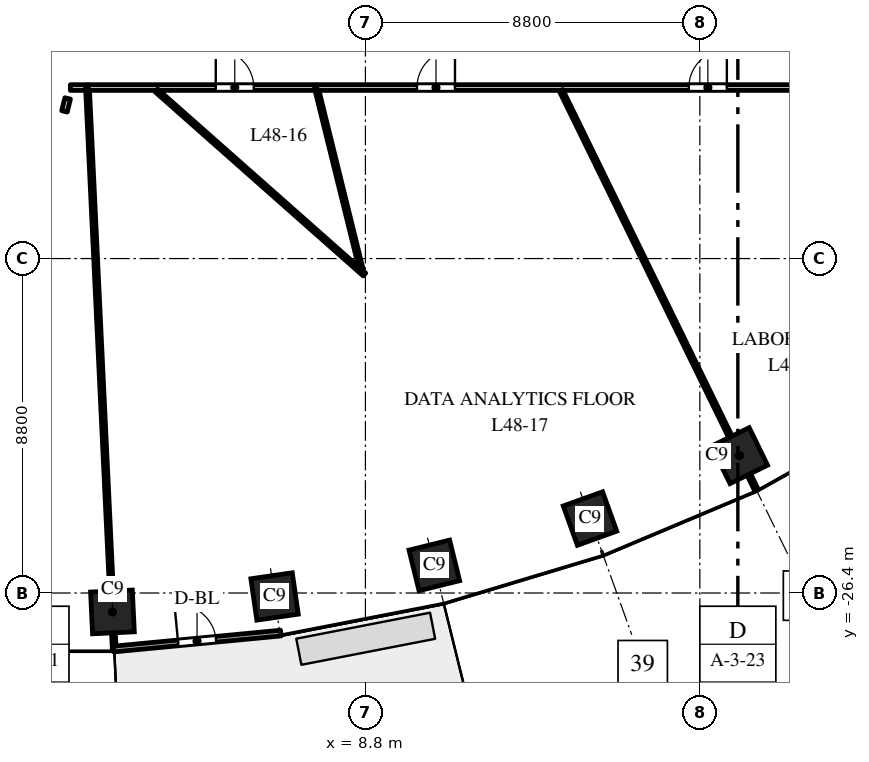
"""IFC4 building model, lengths in metres.
Left out: names, types, materials, properties, quantities, classifications, styles, units other than length and angle.
Written with IfcOpenShell. Run it as: python <this file> out.ifc"""

import sys

from ifc_helpers import new_model, si_unit, direction, frame, frame_2d, origin, origin_2d, place, context, subcontext, project, spatial, rectangle, extrude, element, fill, save


model = new_model("IFC4")
c1 = context("Model", 3, precision=1e-05, world=origin(), true_north=direction((0.0, 1.0)))
c2 = subcontext(c1, "Body", "Model", "MODEL_VIEW")
j1 = project(units=[si_unit("LENGTHUNIT", "METRE"), si_unit("PLANEANGLEUNIT", "RADIAN")], contexts=[c1])
p1 = place(None, origin())
s1 = spatial("IfcSite", under=j1, at=p1, CompositionType="ELEMENT")
p2 = place(p1, origin())
s2 = spatial("IfcBuilding", under=s1, at=p2, CompositionType="ELEMENT")
p3 = place(p2, frame((0.0, 0.0, 233.5)))
s3 = spatial("IfcBuildingStorey", under=s2, at=p3, CompositionType="ELEMENT", Elevation=233.5)
for number, where, z_axis, x_axis in (
    (1, (2.143, -26.898, 0.0), (0.0, 0.0, 1.0), (0.999, 0.048, 0.0)),
    (2, (6.409, -26.491, 0.0), (0.0, 0.0, 1.0), (0.99, 0.143, 0.0)),
    (3, (10.613, -25.674, 0.0), (0.0, 0.0, 1.0), (0.971, 0.24, 0.0)),
    (4, (14.709, -24.441, 0.0), (0.0, 0.0, 1.0), (0.941, 0.338, 0.0)),
    (5, (18.646, -22.785, 0.0), (0.0, 0.0, 1.0), (0.898, 0.439, 0.0)),
):
    element("IfcColumn", number, at=place(p3, frame(where, z_axis=z_axis, x_axis=x_axis)), inside=s3, PredefinedType="COLUMN", context=c2, shape_type="SweptSolid", body=[
        extrude(rectangle(XDim=1.1, YDim=1.1, at=origin_2d()), origin(), (0.0, 0.0, 1.0), 4.0),
    ])
p4 = place(p3, frame((2.166, -27.875, 0.0), z_axis=(0.0, 0.0, 1.0), x_axis=(0.995473879823, 0.095035543824, 0.0)))
e6 = element("IfcWall", 6, at=p4, inside=s3, PredefinedType="STANDARD", context=c2, shape_type="SweptSolid", body=[
    extrude(rectangle(XDim=4.426, YDim=0.15, at=frame_2d((2.213, 0.0))), origin(), (0.0, 0.0, 1.0), 3.7),
])
p5 = place(p4, frame((1.713, 0.0, 0.0)))
e7 = element("IfcOpeningElement", 7, at=p5, cuts=e6, PredefinedType="OPENING", context=c2, shape_type="SweptSolid", body=[
    extrude(rectangle(XDim=1.0, YDim=2.4, at=frame_2d((0.5, 1.2))), frame((0.0, 0.085, 0.0), z_axis=(0.0, -1.0, 0.0), x_axis=(1.0, 0.0, 0.0)), (0.0, 0.0, 1.0), 0.17),
])
p6 = place(p3, frame((0.881, -13.727, 0.0), z_axis=(0.0, 0.0, 1.0), x_axis=(0.239099704585, 0.970995021237, 0.0)))
e8 = element("IfcWall", 8, at=p6, inside=s3, PredefinedType="PARTITIONING", context=c2, shape_type="SweptSolid", body=[
    extrude(rectangle(XDim=0.351, YDim=0.15, at=frame_2d((0.176, 0.0))), origin(), (0.0, 0.0, 1.0), 3.7),
])
p7 = place(p3, frame((1.036, -13.1, 0.0), z_axis=(0.0, 0.0, 1.0), x_axis=(1.0, 0.0, 0.0)))
e9 = element("IfcWall", 9, at=p7, inside=s3, PredefinedType="PARTITIONING", context=c2, shape_type="SweptSolid", body=[
    extrude(rectangle(XDim=0.45, YDim=0.15, at=frame_2d((0.225, 0.0))), origin(), (0.0, 0.0, 1.0), 3.7),
])
p8 = place(p3, frame((1.486, -13.104, 0.0), z_axis=(0.0, 0.0, 1.0), x_axis=(0.047589427933, -0.998866981309, 0.0)))
e10 = element("IfcWall", 10, at=p8, inside=s3, PredefinedType="PARTITIONING", context=c2, shape_type="SweptSolid", body=[
    extrude(rectangle(XDim=14.811, YDim=0.1, at=frame_2d((7.405, 0.0))), origin(), (0.0, 0.0, 1.0), 3.0),
])
p9 = place(p3, frame((1.506, -13.1, 0.0), z_axis=(0.0, 0.0, 1.0), x_axis=(1.0, 0.0, 0.0)))
e11 = element("IfcWall", 11, at=p9, inside=s3, PredefinedType="PARTITIONING", context=c2, shape_type="SweptSolid", body=[
    extrude(rectangle(XDim=6.001, YDim=0.15, at=frame_2d((3.0, 0.0))), origin(), (0.0, 0.0, 1.0), 2.85),
])
p10 = place(p9, frame((3.356, 0.0, 0.0)))
e12 = element("IfcOpeningElement", 12, at=p10, cuts=e11, PredefinedType="OPENING", context=c2, shape_type="SweptSolid", body=[
    extrude(rectangle(XDim=1.0, YDim=2.1, at=frame_2d((0.5, 1.05))), frame((0.0, 0.085, 0.0), z_axis=(0.0, -1.0, 0.0), x_axis=(1.0, 0.0, 0.0)), (0.0, 0.0, 1.0), 0.17),
])
p11 = place(p3, frame((3.3, -13.178, 0.0), z_axis=(0.0, 0.0, 1.0), x_axis=(0.749078819432, -0.662480884462, 0.0)))
e13 = element("IfcWall", 13, at=p11, inside=s3, PredefinedType="PARTITIONING", context=c2, shape_type="SweptSolid", body=[
    extrude(rectangle(XDim=7.307, YDim=0.1, at=frame_2d((3.654, 0.0))), origin(), (0.0, 0.0, 1.0), 3.7),
])
p12 = place(p3, frame((7.507, -13.1, 0.0), z_axis=(0.0, 0.0, 1.0), x_axis=(0.239848980266, -0.970810211455, 0.0)))
e14 = element("IfcWall", 14, at=p12, inside=s3, PredefinedType="PARTITIONING", context=c2, shape_type="SweptSolid", body=[
    extrude(rectangle(XDim=4.919, YDim=0.1, at=frame_2d((2.46, 0.0))), origin(), (0.0, 0.0, 1.0), 3.7),
])
p13 = place(p3, frame((7.524, -13.1, 0.0), z_axis=(0.0, 0.0, 1.0), x_axis=(1.0, 0.0, 0.0)))
e15 = element("IfcWall", 15, at=p13, inside=s3, PredefinedType="PARTITIONING", context=c2, shape_type="SweptSolid", body=[
    extrude(rectangle(XDim=16.476, YDim=0.15, at=frame_2d((8.238, 0.0))), origin(), (0.0, 0.0, 1.0), 2.85),
])
p14 = place(p13, frame((2.633, 0.0, 0.0)))
e16 = element("IfcOpeningElement", 16, at=p14, cuts=e15, PredefinedType="OPENING", context=c2, shape_type="SweptSolid", body=[
    extrude(rectangle(XDim=1.0, YDim=2.1, at=frame_2d((0.5, 1.05))), frame((0.0, 0.085, 0.0), z_axis=(0.0, -1.0, 0.0), x_axis=(1.0, 0.0, 0.0)), (0.0, 0.0, 1.0), 0.17),
])
p15 = place(p13, frame((9.787, 0.0, 0.0)))
e17 = element("IfcOpeningElement", 17, at=p15, cuts=e15, PredefinedType="OPENING", context=c2, shape_type="SweptSolid", body=[
    extrude(rectangle(XDim=1.0, YDim=2.1, at=frame_2d((0.5, 1.05))), frame((0.0, 0.085, 0.0), z_axis=(0.0, -1.0, 0.0), x_axis=(1.0, 0.0, 0.0)), (0.0, 0.0, 1.0), 0.17),
])
p16 = place(p3, frame((13.948, -13.175, 0.0), z_axis=(0.0, 0.0, 1.0), x_axis=(0.439190294188, -0.898394059136, 0.0)))
e18 = element("IfcWall", 18, at=p16, inside=s3, PredefinedType="PARTITIONING", context=c2, shape_type="SweptSolid", body=[
    extrude(rectangle(XDim=11.699, YDim=0.1, at=frame_2d((5.849, 0.0))), origin(), (0.0, 0.0, 1.0), 3.0),
])
p17 = place(p5, origin())
e19 = element("IfcDoor", 19, at=p17, inside=s3, OperationType="SINGLE_SWING_LEFT", PredefinedType="DOOR", context=c2, shape_type="SweptSolid", body=[
    extrude(rectangle(XDim=1.0, YDim=2.4, at=frame_2d((0.5, 1.2))), frame((0.0, 0.025, 0.0), z_axis=(0.0, -1.0, 0.0), x_axis=(1.0, 0.0, 0.0)), (0.0, 0.0, 1.0), 0.05),
])
fill(e7, e19)
p18 = place(p10, origin())
e20 = element("IfcDoor", 20, at=p18, inside=s3, OperationType="SINGLE_SWING_LEFT", PredefinedType="DOOR", context=c2, shape_type="SweptSolid", body=[
    extrude(rectangle(XDim=1.0, YDim=2.1, at=frame_2d((0.5, 1.05))), frame((0.0, 0.025, 0.0), z_axis=(0.0, -1.0, 0.0), x_axis=(1.0, 0.0, 0.0)), (0.0, 0.0, 1.0), 0.05),
])
fill(e12, e20)
p19 = place(p14, origin())
e21 = element("IfcDoor", 21, at=p19, inside=s3, OperationType="SINGLE_SWING_RIGHT", PredefinedType="DOOR", context=c2, shape_type="SweptSolid", body=[
    extrude(rectangle(XDim=1.0, YDim=2.1, at=frame_2d((0.5, 1.05))), frame((0.0, 0.025, 0.0), z_axis=(0.0, -1.0, 0.0), x_axis=(1.0, 0.0, 0.0)), (0.0, 0.0, 1.0), 0.05),
])
fill(e16, e21)
p20 = place(p15, origin())
e22 = element("IfcDoor", 22, at=p20, inside=s3, OperationType="SINGLE_SWING_RIGHT", PredefinedType="DOOR", context=c2, shape_type="SweptSolid", body=[
    extrude(rectangle(XDim=1.0, YDim=2.1, at=frame_2d((0.5, 1.05))), frame((0.0, 0.025, 0.0), z_axis=(0.0, -1.0, 0.0), x_axis=(1.0, 0.0, 0.0)), (0.0, 0.0, 1.0), 0.05),
])
fill(e17, e22)
save(model, sys.argv[1])
